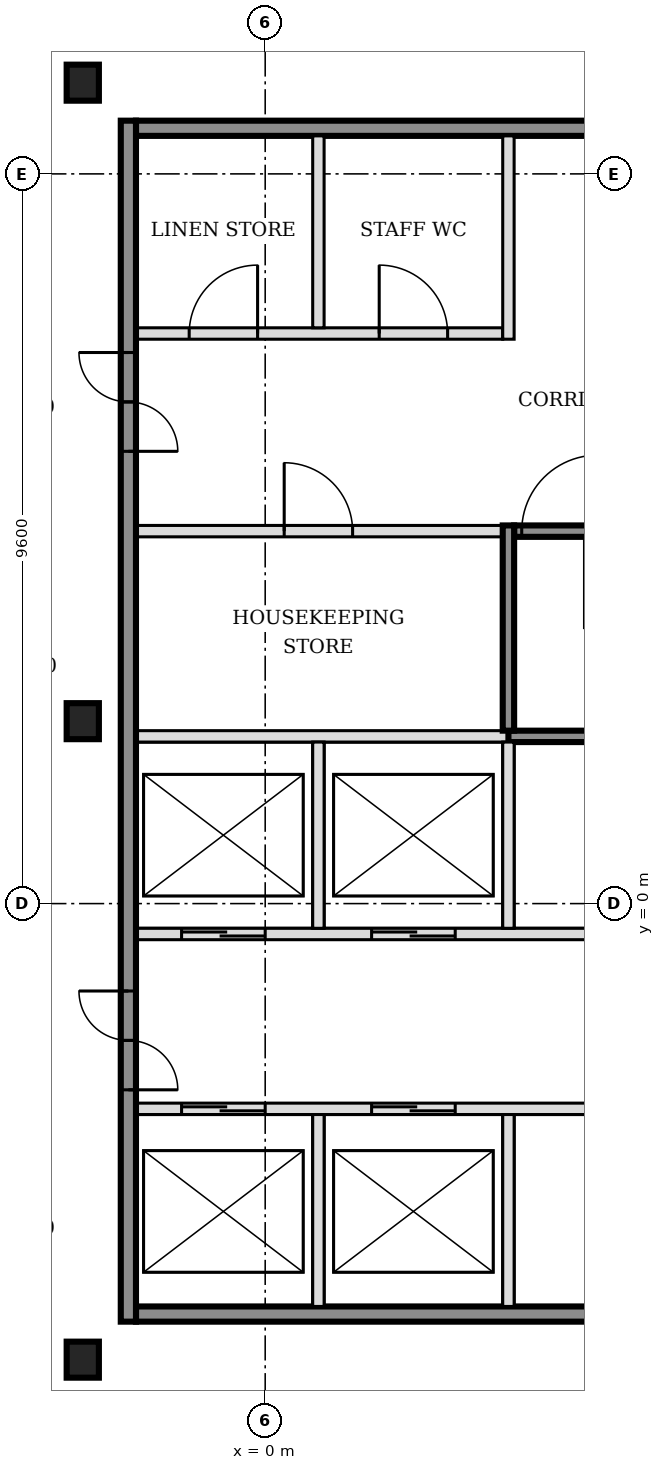
"""IFC4 building model, lengths in metres.
Left out: names, types, materials, properties, quantities, classifications, styles, units other than length and angle.
Written with IfcOpenShell. Run it as: python <this file> out.ifc"""

import sys

from ifc_helpers import new_model, si_unit, direction, frame, frame_2d, origin, origin_2d, place, context, subcontext, project, spatial, rectangle, i_section, extrude, element, fill, save


model = new_model("IFC4")
c1 = context("Model", 3, precision=1e-05, world=origin(), true_north=direction((0.0, 1.0)))
c2 = subcontext(c1, "Body", "Model", "MODEL_VIEW")
j1 = project(units=[si_unit("LENGTHUNIT", "METRE"), si_unit("PLANEANGLEUNIT", "RADIAN")], contexts=[c1])
p1 = place(None, origin())
s1 = spatial("IfcSite", under=j1, at=p1, CompositionType="ELEMENT")
p2 = place(p1, origin())
s2 = spatial("IfcBuilding", under=s1, at=p2, CompositionType="ELEMENT")
p3 = place(p2, frame((0.0, 0.0, 115.8)))
s3 = spatial("IfcBuildingStorey", under=s2, at=p3, CompositionType="ELEMENT", Elevation=115.8)
for number, where, z_axis, x_axis in (
    (1, (-2.4, -6.0, -0.15), (0.0, 0.0, 1.0), (1.0, 0.0, 0.0)),
    (2, (-2.4, 2.4, -0.15), (0.0, 0.0, 1.0), (1.0, 0.0, 0.0)),
    (3, (-2.4, 10.8, -0.15), (0.0, 0.0, 1.0), (1.0, 0.0, 0.0)),
):
    element("IfcColumn", number, at=place(p3, frame(where, z_axis=z_axis, x_axis=x_axis)), inside=s3, PredefinedType="COLUMN", context=c2, shape_type="SweptSolid", body=[
        extrude(i_section(OverallWidth=0.424, OverallDepth=0.474, WebThickness=0.048, FlangeThickness=0.077, FilletRadius=0.015, at=origin_2d()), origin(), (0.0, 0.0, 1.0), 3.5),
    ])
p4 = place(p3, frame((-1.7, -5.4, 0.0), z_axis=(0.0, 0.0, 1.0), x_axis=(1.0, 0.0, 0.0)))
e4 = element("IfcWall", 4, at=p4, inside=s3, PredefinedType="SOLIDWALL", context=c2, shape_type="SweptSolid", body=[
    extrude(rectangle(XDim=7.9, YDim=0.2, at=frame_2d((3.95, 0.0))), origin(), (0.0, 0.0, 1.0), 3.35),
])
p5 = place(p3, frame((-1.7, -2.7, 0.0), z_axis=(0.0, 0.0, 1.0), x_axis=(1.0, 0.0, 0.0)))
e5 = element("IfcWall", 5, at=p5, inside=s3, PredefinedType="SOLIDWALL", context=c2, shape_type="SweptSolid", body=[
    extrude(rectangle(XDim=7.9, YDim=0.15, at=frame_2d((3.95, 0.0))), origin(), (0.0, 0.0, 1.0), 3.35),
])
p6 = place(p5, frame((0.6, 0.0, 0.0)))
e6 = element("IfcOpeningElement", 6, at=p6, cuts=e5, PredefinedType="OPENING", context=c2, shape_type="SweptSolid", body=[
    extrude(rectangle(XDim=1.1, YDim=2.1, at=frame_2d((0.55, 1.05))), frame((0.0, 0.085, 0.0), z_axis=(0.0, -1.0, 0.0), x_axis=(1.0, 0.0, 0.0)), (0.0, 0.0, 1.0), 0.17),
])
p7 = place(p5, frame((3.1, 0.0, 0.0)))
e7 = element("IfcOpeningElement", 7, at=p7, cuts=e5, PredefinedType="OPENING", context=c2, shape_type="SweptSolid", body=[
    extrude(rectangle(XDim=1.1, YDim=2.1, at=frame_2d((0.55, 1.05))), frame((0.0, 0.085, 0.0), z_axis=(0.0, -1.0, 0.0), x_axis=(1.0, 0.0, 0.0)), (0.0, 0.0, 1.0), 0.17),
])
p8 = place(p3, frame((-1.7, -0.4, 0.0), z_axis=(0.0, 0.0, 1.0), x_axis=(1.0, 0.0, 0.0)))
e8 = element("IfcWall", 8, at=p8, inside=s3, PredefinedType="SOLIDWALL", context=c2, shape_type="SweptSolid", body=[
    extrude(rectangle(XDim=15.925, YDim=0.15, at=frame_2d((7.962, 0.0))), origin(), (0.0, 0.0, 1.0), 3.35),
])
p9 = place(p8, frame((0.6, 0.0, 0.0)))
e9 = element("IfcOpeningElement", 9, at=p9, cuts=e8, PredefinedType="OPENING", context=c2, shape_type="SweptSolid", body=[
    extrude(rectangle(XDim=1.1, YDim=2.1, at=frame_2d((0.55, 1.05))), frame((0.0, 0.085, 0.0), z_axis=(0.0, -1.0, 0.0), x_axis=(1.0, 0.0, 0.0)), (0.0, 0.0, 1.0), 0.17),
])
p10 = place(p8, frame((3.1, 0.0, 0.0)))
e10 = element("IfcOpeningElement", 10, at=p10, cuts=e8, PredefinedType="OPENING", context=c2, shape_type="SweptSolid", body=[
    extrude(rectangle(XDim=1.1, YDim=2.1, at=frame_2d((0.55, 1.05))), frame((0.0, 0.085, 0.0), z_axis=(0.0, -1.0, 0.0), x_axis=(1.0, 0.0, 0.0)), (0.0, 0.0, 1.0), 0.17),
])
p11 = place(p8, frame((11.575, 0.0, 0.0)))
e11 = element("IfcOpeningElement", 11, at=p11, cuts=e8, PredefinedType="OPENING", context=c2, shape_type="SweptSolid", body=[
    extrude(rectangle(XDim=1.2, YDim=2.1, at=frame_2d((0.6, 1.05))), frame((0.0, 0.085, 0.0), z_axis=(0.0, -1.0, 0.0), x_axis=(1.0, 0.0, 0.0)), (0.0, 0.0, 1.0), 0.17),
])
p12 = place(p8, frame((14.125, 0.0, 0.0)))
e12 = element("IfcOpeningElement", 12, at=p12, cuts=e8, PredefinedType="OPENING", context=c2, shape_type="SweptSolid", body=[
    extrude(rectangle(XDim=1.2, YDim=2.1, at=frame_2d((0.6, 1.05))), frame((0.0, 0.085, 0.0), z_axis=(0.0, -1.0, 0.0), x_axis=(1.0, 0.0, 0.0)), (0.0, 0.0, 1.0), 0.17),
])
p13 = place(p3, frame((-1.7, 2.2, 0.0), z_axis=(0.0, 0.0, 1.0), x_axis=(1.0, 0.0, 0.0)))
e13 = element("IfcWall", 13, at=p13, inside=s3, PredefinedType="SOLIDWALL", context=c2, shape_type="SweptSolid", body=[
    extrude(rectangle(XDim=4.9, YDim=0.15, at=frame_2d((2.45, 0.0))), origin(), (0.0, 0.0, 1.0), 3.35),
])
p14 = place(p3, frame((3.2, 2.2, 0.0), z_axis=(0.0, 0.0, 1.0), x_axis=(1.0, 0.0, 0.0)))
e14 = element("IfcWall", 14, at=p14, inside=s3, PredefinedType="SOLIDWALL", context=c2, shape_type="SweptSolid", body=[
    extrude(rectangle(XDim=6.5, YDim=0.15, at=frame_2d((3.25, 0.0))), origin(), (0.0, 0.0, 1.0), 3.35),
])
p15 = place(p3, frame((-1.7, 4.9, 0.0), z_axis=(0.0, 0.0, 1.0), x_axis=(1.0, 0.0, 0.0)))
e15 = element("IfcWall", 15, at=p15, inside=s3, PredefinedType="PARTITIONING", context=c2, shape_type="SweptSolid", body=[
    extrude(rectangle(XDim=4.825, YDim=0.15, at=frame_2d((2.413, 0.0))), origin(), (0.0, 0.0, 1.0), 3.35),
])
p16 = place(p15, frame((1.95, 0.0, 0.0)))
e16 = element("IfcOpeningElement", 16, at=p16, cuts=e15, PredefinedType="OPENING", context=c2, shape_type="SweptSolid", body=[
    extrude(rectangle(XDim=0.9, YDim=2.1, at=frame_2d((0.45, 1.05))), frame((0.0, 0.085, 0.0), z_axis=(0.0, -1.0, 0.0), x_axis=(1.0, 0.0, 0.0)), (0.0, 0.0, 1.0), 0.17),
])
p17 = place(p3, frame((3.275, 4.9, 0.0), z_axis=(0.0, 0.0, 1.0), x_axis=(1.0, 0.0, 0.0)))
e17 = element("IfcWall", 17, at=p17, inside=s3, PredefinedType="SOLIDWALL", context=c2, shape_type="SweptSolid", body=[
    extrude(rectangle(XDim=6.425, YDim=0.15, at=frame_2d((3.212, 0.0))), origin(), (0.0, 0.0, 1.0), 3.35),
])
p18 = place(p17, frame((0.1, 0.0, 0.0)))
e18 = element("IfcOpeningElement", 18, at=p18, cuts=e17, PredefinedType="OPENING", context=c2, shape_type="SweptSolid", body=[
    extrude(rectangle(XDim=1.0, YDim=2.1, at=frame_2d((0.5, 1.05))), frame((0.0, 0.085, 0.0), z_axis=(0.0, -1.0, 0.0), x_axis=(1.0, 0.0, 0.0)), (0.0, 0.0, 1.0), 0.17),
])
p19 = place(p3, frame((-1.7, 7.5, 0.0), z_axis=(0.0, 0.0, 1.0), x_axis=(1.0, 0.0, 0.0)))
e19 = element("IfcWall", 19, at=p19, inside=s3, PredefinedType="PARTITIONING", context=c2, shape_type="SweptSolid", body=[
    extrude(rectangle(XDim=4.825, YDim=0.15, at=frame_2d((2.413, 0.0))), origin(), (0.0, 0.0, 1.0), 3.35),
])
p20 = place(p19, frame((0.7, 0.0, 0.0)))
e20 = element("IfcOpeningElement", 20, at=p20, cuts=e19, PredefinedType="OPENING", context=c2, shape_type="SweptSolid", body=[
    extrude(rectangle(XDim=0.9, YDim=2.1, at=frame_2d((0.45, 1.05))), frame((0.0, 0.085, 0.0), z_axis=(0.0, -1.0, 0.0), x_axis=(1.0, 0.0, 0.0)), (0.0, 0.0, 1.0), 0.17),
])
p21 = place(p19, frame((3.2, 0.0, 0.0)))
e21 = element("IfcOpeningElement", 21, at=p21, cuts=e19, PredefinedType="OPENING", context=c2, shape_type="SweptSolid", body=[
    extrude(rectangle(XDim=0.9, YDim=2.1, at=frame_2d((0.45, 1.05))), frame((0.0, 0.085, 0.0), z_axis=(0.0, -1.0, 0.0), x_axis=(1.0, 0.0, 0.0)), (0.0, 0.0, 1.0), 0.17),
])
p22 = place(p3, frame((-1.7, 10.2, 0.0), z_axis=(0.0, 0.0, 1.0), x_axis=(1.0, 0.0, 0.0)))
e22 = element("IfcWall", 22, at=p22, inside=s3, PredefinedType="SOLIDWALL", context=c2, shape_type="SweptSolid", body=[
    extrude(rectangle(XDim=7.9, YDim=0.2, at=frame_2d((3.95, 0.0))), origin(), (0.0, 0.0, 1.0), 3.35),
])
p23 = place(p3, frame((-1.8, -5.5, 0.0), z_axis=(0.0, 0.0, 1.0), x_axis=(0.0, 1.0, 0.0)))
e23 = element("IfcWall", 23, at=p23, inside=s3, PredefinedType="SOLIDWALL", context=c2, shape_type="SweptSolid", body=[
    extrude(rectangle(XDim=15.8, YDim=0.2, at=frame_2d((7.9, 0.0))), origin(), (0.0, 0.0, 1.0), 3.35),
])
p24 = place(p23, frame((3.05, 0.0, 0.0)))
e24 = element("IfcOpeningElement", 24, at=p24, cuts=e23, PredefinedType="OPENING", context=c2, shape_type="SweptSolid", body=[
    extrude(rectangle(XDim=1.3, YDim=2.1, at=frame_2d((0.65, 1.05))), frame((0.0, 0.11, 0.0), z_axis=(0.0, -1.0, 0.0), x_axis=(1.0, 0.0, 0.0)), (0.0, 0.0, 1.0), 0.22),
])
p25 = place(p23, frame((11.45, 0.0, 0.0)))
e25 = element("IfcOpeningElement", 25, at=p25, cuts=e23, PredefinedType="OPENING", context=c2, shape_type="SweptSolid", body=[
    extrude(rectangle(XDim=1.3, YDim=2.1, at=frame_2d((0.65, 1.05))), frame((0.0, 0.11, 0.0), z_axis=(0.0, -1.0, 0.0), x_axis=(1.0, 0.0, 0.0)), (0.0, 0.0, 1.0), 0.22),
])
p26 = place(p3, frame((0.7, -5.3, 0.0), z_axis=(0.0, 0.0, 1.0), x_axis=(0.0, 1.0, 0.0)))
e26 = element("IfcWall", 26, at=p26, inside=s3, PredefinedType="SOLIDWALL", context=c2, shape_type="SweptSolid", body=[
    extrude(rectangle(XDim=2.525, YDim=0.15, at=frame_2d((1.263, 0.0))), origin(), (0.0, 0.0, 1.0), 3.35),
])
p27 = place(p3, frame((0.7, -0.325, 0.0), z_axis=(0.0, 0.0, 1.0), x_axis=(0.0, 1.0, 0.0)))
e27 = element("IfcWall", 27, at=p27, inside=s3, PredefinedType="SOLIDWALL", context=c2, shape_type="SweptSolid", body=[
    extrude(rectangle(XDim=2.45, YDim=0.15, at=frame_2d((1.225, 0.0))), origin(), (0.0, 0.0, 1.0), 3.35),
])
p28 = place(p3, frame((0.7, 7.575, 0.0), z_axis=(0.0, 0.0, 1.0), x_axis=(0.0, 1.0, 0.0)))
e28 = element("IfcWall", 28, at=p28, inside=s3, PredefinedType="PARTITIONING", context=c2, shape_type="SweptSolid", body=[
    extrude(rectangle(XDim=2.525, YDim=0.15, at=frame_2d((1.263, 0.0))), origin(), (0.0, 0.0, 1.0), 3.35),
])
p29 = place(p3, frame((3.2, -5.3, 0.0), z_axis=(0.0, 0.0, 1.0), x_axis=(0.0, 1.0, 0.0)))
e29 = element("IfcWall", 29, at=p29, inside=s3, PredefinedType="SOLIDWALL", context=c2, shape_type="SweptSolid", body=[
    extrude(rectangle(XDim=2.525, YDim=0.15, at=frame_2d((1.263, 0.0))), origin(), (0.0, 0.0, 1.0), 3.35),
])
p30 = place(p3, frame((3.2, -0.325, 0.0), z_axis=(0.0, 0.0, 1.0), x_axis=(0.0, 1.0, 0.0)))
e30 = element("IfcWall", 30, at=p30, inside=s3, PredefinedType="SOLIDWALL", context=c2, shape_type="SweptSolid", body=[
    extrude(rectangle(XDim=2.45, YDim=0.15, at=frame_2d((1.225, 0.0))), origin(), (0.0, 0.0, 1.0), 3.35),
])
p31 = place(p3, frame((3.2, 2.275, 0.0), z_axis=(0.0, 0.0, 1.0), x_axis=(0.0, 1.0, 0.0)))
e31 = element("IfcWall", 31, at=p31, inside=s3, PredefinedType="SOLIDWALL", context=c2, shape_type="SweptSolid", body=[
    extrude(rectangle(XDim=2.7, YDim=0.15, at=frame_2d((1.35, 0.0))), origin(), (0.0, 0.0, 1.0), 3.35),
])
p32 = place(p3, frame((3.2, 7.425, 0.0), z_axis=(0.0, 0.0, 1.0), x_axis=(0.0, 1.0, 0.0)))
e32 = element("IfcWall", 32, at=p32, inside=s3, PredefinedType="PARTITIONING", context=c2, shape_type="SweptSolid", body=[
    extrude(rectangle(XDim=2.675, YDim=0.15, at=frame_2d((1.337, 0.0))), origin(), (0.0, 0.0, 1.0), 3.35),
])
p33 = place(p6, origin())
e33 = element("IfcDoor", 33, at=p33, inside=s3, OperationType="DOUBLE_DOOR_SLIDING", PredefinedType="DOOR", context=c2, shape_type="SweptSolid", body=[
    extrude(rectangle(XDim=1.1, YDim=2.1, at=frame_2d((0.55, 1.05))), frame((0.0, 0.025, 0.0), z_axis=(0.0, -1.0, 0.0), x_axis=(1.0, 0.0, 0.0)), (0.0, 0.0, 1.0), 0.05),
])
fill(e6, e33)
p34 = place(p7, origin())
e34 = element("IfcDoor", 34, at=p34, inside=s3, OperationType="DOUBLE_DOOR_SLIDING", PredefinedType="DOOR", context=c2, shape_type="SweptSolid", body=[
    extrude(rectangle(XDim=1.1, YDim=2.1, at=frame_2d((0.55, 1.05))), frame((0.0, 0.025, 0.0), z_axis=(0.0, -1.0, 0.0), x_axis=(1.0, 0.0, 0.0)), (0.0, 0.0, 1.0), 0.05),
])
fill(e7, e34)
p35 = place(p9, origin())
e35 = element("IfcDoor", 35, at=p35, inside=s3, OperationType="DOUBLE_DOOR_SLIDING", PredefinedType="DOOR", context=c2, shape_type="SweptSolid", body=[
    extrude(rectangle(XDim=1.1, YDim=2.1, at=frame_2d((0.55, 1.05))), frame((0.0, 0.025, 0.0), z_axis=(0.0, -1.0, 0.0), x_axis=(1.0, 0.0, 0.0)), (0.0, 0.0, 1.0), 0.05),
])
fill(e9, e35)
p36 = place(p10, origin())
e36 = element("IfcDoor", 36, at=p36, inside=s3, OperationType="DOUBLE_DOOR_SLIDING", PredefinedType="DOOR", context=c2, shape_type="SweptSolid", body=[
    extrude(rectangle(XDim=1.1, YDim=2.1, at=frame_2d((0.55, 1.05))), frame((0.0, 0.025, 0.0), z_axis=(0.0, -1.0, 0.0), x_axis=(1.0, 0.0, 0.0)), (0.0, 0.0, 1.0), 0.05),
])
fill(e10, e36)
p37 = place(p18, origin())
e37 = element("IfcDoor", 37, at=p37, inside=s3, OperationType="SINGLE_SWING_RIGHT", PredefinedType="DOOR", context=c2, shape_type="SweptSolid", body=[
    extrude(rectangle(XDim=1.0, YDim=2.1, at=frame_2d((0.5, 1.05))), frame((0.0, 0.025, 0.0), z_axis=(0.0, -1.0, 0.0), x_axis=(1.0, 0.0, 0.0)), (0.0, 0.0, 1.0), 0.05),
])
fill(e18, e37)
p38 = place(p24, origin())
e38 = element("IfcDoor", 38, at=p38, inside=s3, OperationType="DOUBLE_DOOR_SINGLE_SWING", PredefinedType="DOOR", context=c2, shape_type="SweptSolid", body=[
    extrude(rectangle(XDim=1.3, YDim=2.1, at=frame_2d((0.65, 1.05))), frame((0.0, 0.025, 0.0), z_axis=(0.0, -1.0, 0.0), x_axis=(1.0, 0.0, 0.0)), (0.0, 0.0, 1.0), 0.05),
])
fill(e24, e38)
p39 = place(p25, origin())
e39 = element("IfcDoor", 39, at=p39, inside=s3, OperationType="DOUBLE_DOOR_SINGLE_SWING", PredefinedType="DOOR", context=c2, shape_type="SweptSolid", body=[
    extrude(rectangle(XDim=1.3, YDim=2.1, at=frame_2d((0.65, 1.05))), frame((0.0, 0.025, 0.0), z_axis=(0.0, -1.0, 0.0), x_axis=(1.0, 0.0, 0.0)), (0.0, 0.0, 1.0), 0.05),
])
fill(e25, e39)
p40 = place(p16, origin())
e40 = element("IfcDoor", 40, at=p40, inside=s3, OperationType="SINGLE_SWING_LEFT", PredefinedType="DOOR", context=c2, shape_type="SweptSolid", body=[
    extrude(rectangle(XDim=0.9, YDim=2.1, at=frame_2d((0.45, 1.05))), frame((0.0, 0.025, 0.0), z_axis=(0.0, -1.0, 0.0), x_axis=(1.0, 0.0, 0.0)), (0.0, 0.0, 1.0), 0.05),
])
fill(e16, e40)
p41 = place(p20, origin())
e41 = element("IfcDoor", 41, at=p41, inside=s3, OperationType="SINGLE_SWING_RIGHT", PredefinedType="DOOR", context=c2, shape_type="SweptSolid", body=[
    extrude(rectangle(XDim=0.9, YDim=2.1, at=frame_2d((0.45, 1.05))), frame((0.0, 0.025, 0.0), z_axis=(0.0, -1.0, 0.0), x_axis=(1.0, 0.0, 0.0)), (0.0, 0.0, 1.0), 0.05),
])
fill(e20, e41)
p42 = place(p21, origin())
e42 = element("IfcDoor", 42, at=p42, inside=s3, OperationType="SINGLE_SWING_LEFT", PredefinedType="DOOR", context=c2, shape_type="SweptSolid", body=[
    extrude(rectangle(XDim=0.9, YDim=2.1, at=frame_2d((0.45, 1.05))), frame((0.0, 0.025, 0.0), z_axis=(0.0, -1.0, 0.0), x_axis=(1.0, 0.0, 0.0)), (0.0, 0.0, 1.0), 0.05),
])
fill(e21, e42)
save(model, sys.argv[1])
